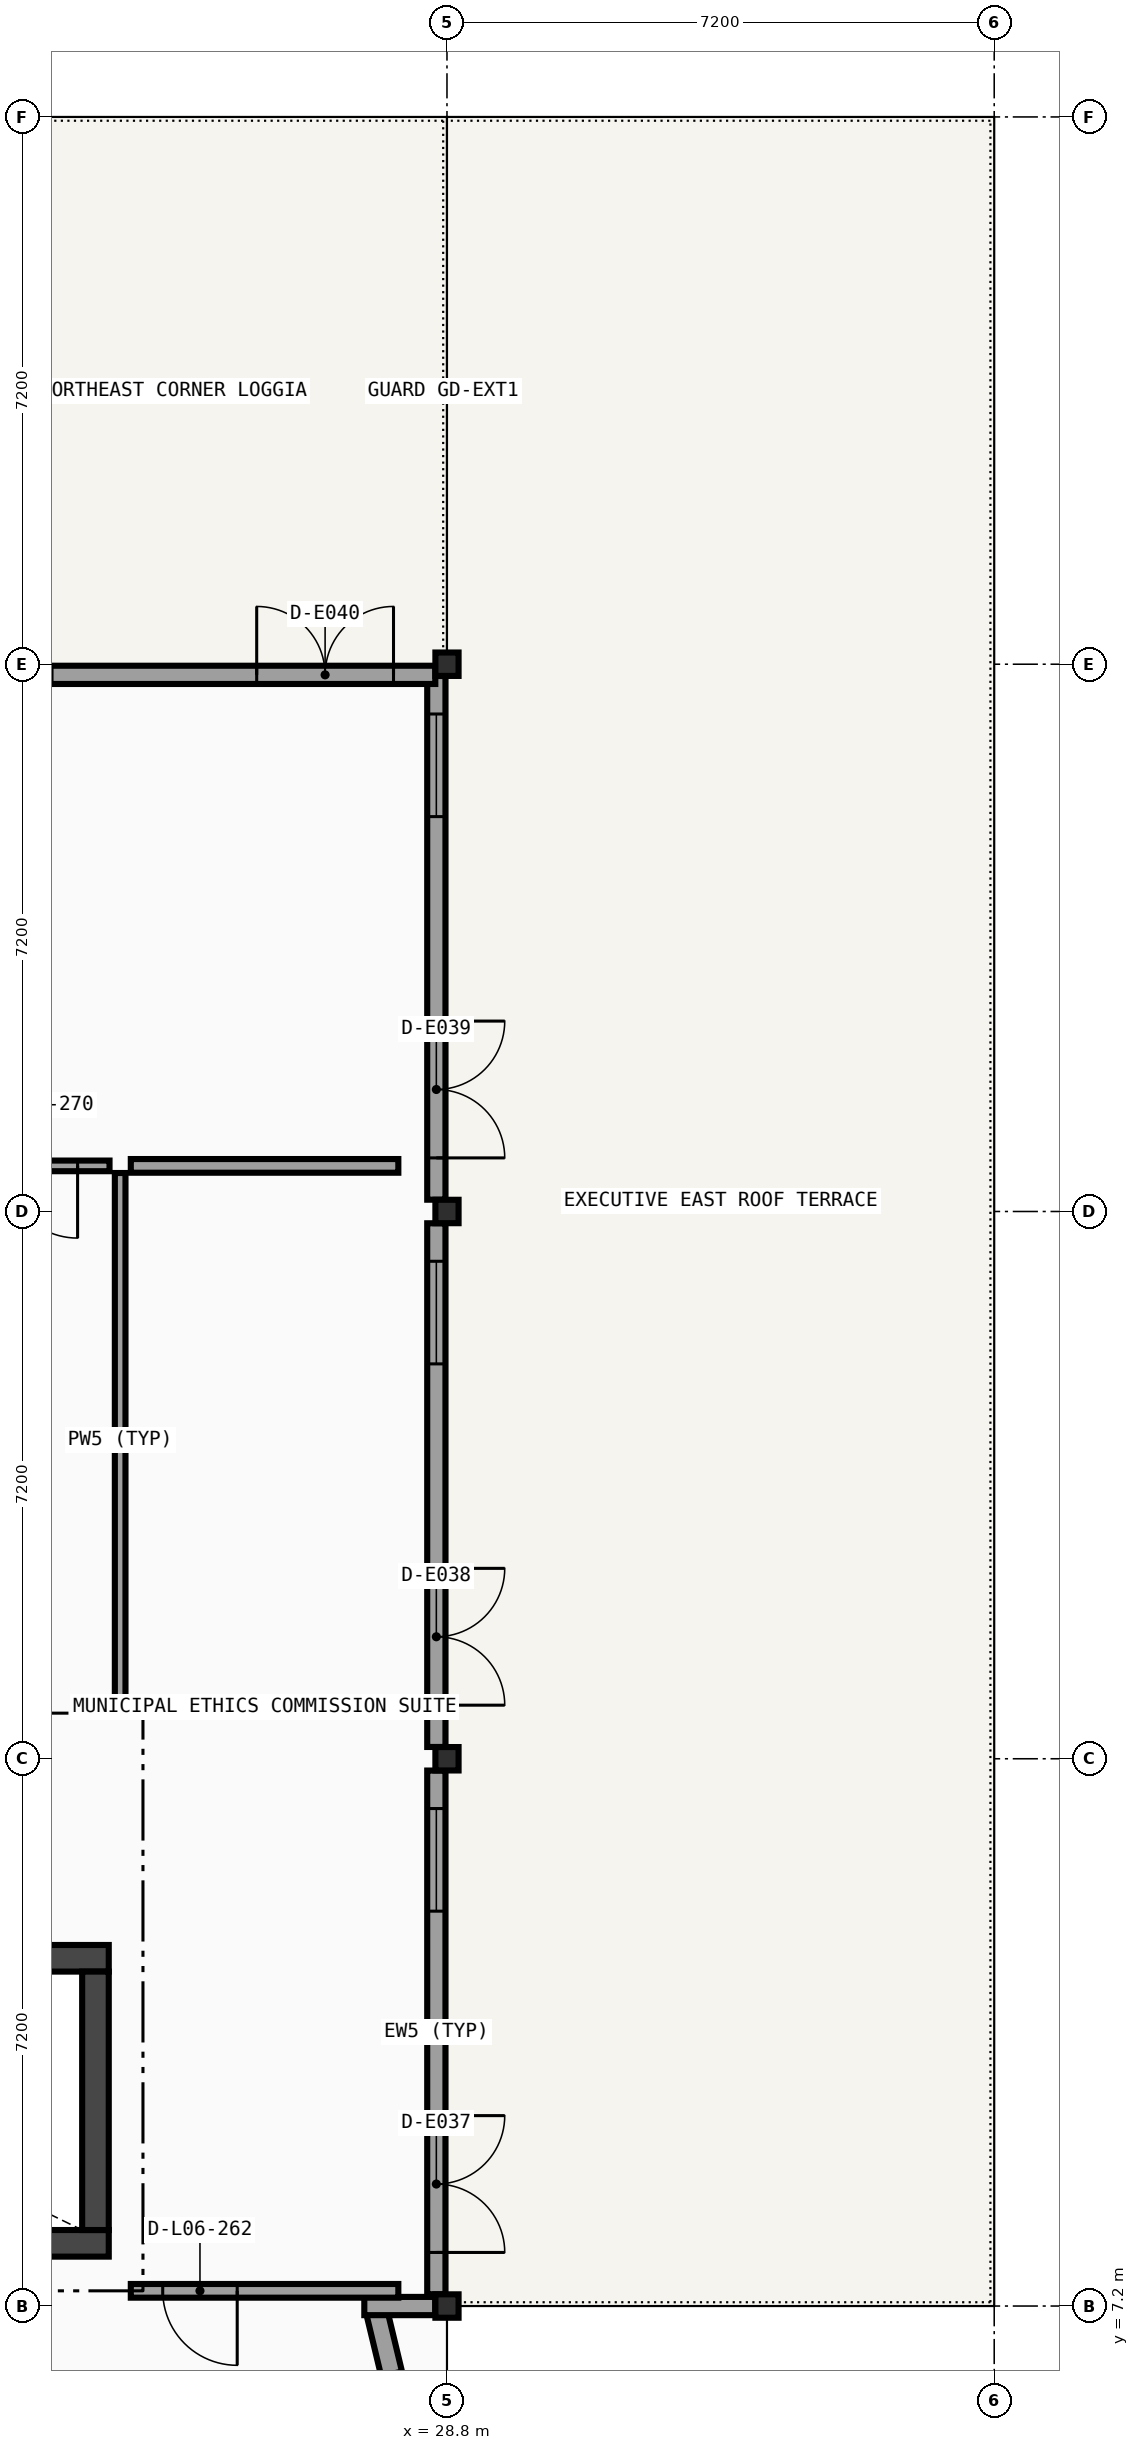
"""IFC4 building model, lengths in metres.
Left out: names, types, materials, properties, quantities, classifications, styles, units other than length and angle.
Written with IfcOpenShell. Run it as: python <this file> out.ifc"""

import sys

from ifc_helpers import new_model, si_unit, direction, frame, frame_2d, origin, origin_2d, place, context, subcontext, project, spatial, rectangle, i_section, extrude, element, fill, save


model = new_model("IFC4")
c1 = context("Model", 3, precision=1e-05, world=origin(), true_north=direction((0.0, 1.0)))
c2 = subcontext(c1, "Body", "Model", "MODEL_VIEW")
j1 = project(units=[si_unit("LENGTHUNIT", "METRE"), si_unit("PLANEANGLEUNIT", "RADIAN")], contexts=[c1])
p1 = place(None, origin())
s1 = spatial("IfcSite", under=j1, at=p1, CompositionType="ELEMENT")
p2 = place(p1, origin())
s2 = spatial("IfcBuilding", under=s1, at=p2, CompositionType="ELEMENT")
p3 = place(p2, frame((0.0, 0.0, 27.0)))
s3 = spatial("IfcBuildingStorey", under=s2, at=p3, CompositionType="ELEMENT", Elevation=27.0)
for number, where, z_axis, x_axis in (
    (1, (28.8, 7.2, 0.0), (0.0, 0.0, 1.0), (1.0, 0.0, 0.0)),
    (2, (28.8, 14.4, 0.0), (0.0, 0.0, 1.0), (1.0, 0.0, 0.0)),
    (3, (28.8, 21.6, 0.0), (0.0, 0.0, 1.0), (1.0, 0.0, 0.0)),
    (4, (28.8, 28.8, 0.0), (0.0, 0.0, 1.0), (1.0, 0.0, 0.0)),
):
    element("IfcColumn", number, at=place(p3, frame(where, z_axis=z_axis, x_axis=x_axis)), inside=s3, PredefinedType="COLUMN", context=c2, shape_type="SweptSolid", body=[
        extrude(i_section(OverallWidth=0.305, OverallDepth=0.308, WebThickness=0.01, FlangeThickness=0.015, FilletRadius=0.015, at=origin_2d()), origin(), (0.0, 0.0, 1.0), 4.05),
    ])
p4 = place(p3, frame((28.64, 3.94, 0.0), z_axis=(0.0, 0.0, 1.0), x_axis=(-0.233443812137, 0.972370292931, 0.0)))
e5 = element("IfcWall", 5, at=p4, inside=s3, PredefinedType="SOLIDWALL", context=c2, shape_type="SweptSolid", body=[
    extrude(rectangle(XDim=3.258, YDim=0.28, at=frame_2d((1.629, 0.0))), origin(), (0.0, 0.0, 1.0), 3.246),
])
p5 = place(p4, frame((0.804, 0.0, 0.8)))
e6 = element("IfcOpeningElement", 6, at=p5, cuts=e5, PredefinedType="OPENING", context=c2, shape_type="SweptSolid", body=[
    extrude(rectangle(XDim=1.65, YDim=1.9, at=frame_2d((0.825, 0.95))), frame((0.0, 0.15, 0.0), z_axis=(0.0, -1.0, 0.0), x_axis=(1.0, 0.0, 0.0)), (0.0, 0.0, 1.0), 0.3),
])
p6 = place(p3, frame((27.712, 7.2, 0.0), z_axis=(0.0, 0.0, 1.0), x_axis=(1.0, 0.0, 0.0)))
e7 = element("IfcWall", 7, at=p6, inside=s3, PredefinedType="SOLIDWALL", context=c2, shape_type="SweptSolid", body=[
    extrude(rectangle(XDim=0.933, YDim=0.24, at=frame_2d((0.467, 0.0))), origin(), (0.0, 0.0, 1.0), 3.246),
])
p7 = place(p3, frame((28.66, 7.355, 0.0), z_axis=(0.0, 0.0, 1.0), x_axis=(0.0, 1.0, 0.0)))
e8 = element("IfcWall", 8, at=p7, inside=s3, PredefinedType="SOLIDWALL", context=c2, shape_type="SweptSolid", body=[
    extrude(rectangle(XDim=6.89, YDim=0.24, at=frame_2d((3.445, 0.0))), origin(), (0.0, 0.0, 1.0), 3.256),
])
p8 = place(p7, frame((0.55, 0.0, 0.0)))
e9 = element("IfcOpeningElement", 9, at=p8, cuts=e8, PredefinedType="OPENING", context=c2, shape_type="SweptSolid", body=[
    extrude(rectangle(XDim=1.8, YDim=2.15, at=frame_2d((0.9, 1.075))), frame((0.0, 0.13, 0.0), z_axis=(0.0, -1.0, 0.0), x_axis=(1.0, 0.0, 0.0)), (0.0, 0.0, 1.0), 0.26),
])
p9 = place(p7, frame((5.04, 0.0, 0.85)))
e10 = element("IfcOpeningElement", 10, at=p9, cuts=e8, PredefinedType="OPENING", context=c2, shape_type="SweptSolid", body=[
    extrude(rectangle(XDim=1.35, YDim=1.85, at=frame_2d((0.675, 0.925))), frame((0.0, 0.13, 0.0), z_axis=(0.0, -1.0, 0.0), x_axis=(1.0, 0.0, 0.0)), (0.0, 0.0, 1.0), 0.26),
])
p10 = place(p3, frame((28.66, 14.555, 0.0), z_axis=(0.0, 0.0, 1.0), x_axis=(0.0, 1.0, 0.0)))
e11 = element("IfcWall", 11, at=p10, inside=s3, PredefinedType="SOLIDWALL", context=c2, shape_type="SweptSolid", body=[
    extrude(rectangle(XDim=6.89, YDim=0.24, at=frame_2d((3.445, 0.0))), origin(), (0.0, 0.0, 1.0), 3.256),
])
p11 = place(p10, frame((0.55, 0.0, 0.0)))
e12 = element("IfcOpeningElement", 12, at=p11, cuts=e11, PredefinedType="OPENING", context=c2, shape_type="SweptSolid", body=[
    extrude(rectangle(XDim=1.8, YDim=2.15, at=frame_2d((0.9, 1.075))), frame((0.0, 0.13, 0.0), z_axis=(0.0, -1.0, 0.0), x_axis=(1.0, 0.0, 0.0)), (0.0, 0.0, 1.0), 0.26),
])
p12 = place(p10, frame((5.04, 0.0, 0.85)))
e13 = element("IfcOpeningElement", 13, at=p12, cuts=e11, PredefinedType="OPENING", context=c2, shape_type="SweptSolid", body=[
    extrude(rectangle(XDim=1.35, YDim=1.85, at=frame_2d((0.675, 0.925))), frame((0.0, 0.13, 0.0), z_axis=(0.0, -1.0, 0.0), x_axis=(1.0, 0.0, 0.0)), (0.0, 0.0, 1.0), 0.26),
])
p13 = place(p3, frame((28.66, 21.755, 0.0), z_axis=(0.0, 0.0, 1.0), x_axis=(0.0, 1.0, 0.0)))
e14 = element("IfcWall", 14, at=p13, inside=s3, PredefinedType="SOLIDWALL", context=c2, shape_type="SweptSolid", body=[
    extrude(rectangle(XDim=6.89, YDim=0.24, at=frame_2d((3.445, 0.0))), origin(), (0.0, 0.0, 1.0), 3.256),
])
p14 = place(p13, frame((0.55, 0.0, 0.0)))
e15 = element("IfcOpeningElement", 15, at=p14, cuts=e14, PredefinedType="OPENING", context=c2, shape_type="SweptSolid", body=[
    extrude(rectangle(XDim=1.8, YDim=2.15, at=frame_2d((0.9, 1.075))), frame((0.0, 0.13, 0.0), z_axis=(0.0, -1.0, 0.0), x_axis=(1.0, 0.0, 0.0)), (0.0, 0.0, 1.0), 0.26),
])
p15 = place(p13, frame((5.04, 0.0, 0.85)))
e16 = element("IfcOpeningElement", 16, at=p15, cuts=e14, PredefinedType="OPENING", context=c2, shape_type="SweptSolid", body=[
    extrude(rectangle(XDim=1.35, YDim=1.85, at=frame_2d((0.675, 0.925))), frame((0.0, 0.13, 0.0), z_axis=(0.0, -1.0, 0.0), x_axis=(1.0, 0.0, 0.0)), (0.0, 0.0, 1.0), 0.26),
])
p16 = place(p3, frame((28.646, 28.66, 0.0), z_axis=(0.0, 0.0, 1.0), x_axis=(-1.0, 0.0, 0.0)))
e17 = element("IfcWall", 17, at=p16, inside=s3, PredefinedType="SOLIDWALL", context=c2, shape_type="SweptSolid", body=[
    extrude(rectangle(XDim=6.893, YDim=0.24, at=frame_2d((3.447, 0.0))), origin(), (0.0, 0.0, 1.0), 3.246),
])
p17 = place(p16, frame((0.55, 0.0, 0.0)))
e18 = element("IfcOpeningElement", 18, at=p17, cuts=e17, PredefinedType="OPENING", context=c2, shape_type="SweptSolid", body=[
    extrude(rectangle(XDim=1.8, YDim=2.15, at=frame_2d((0.9, 1.075))), frame((0.0, 0.13, 0.0), z_axis=(0.0, -1.0, 0.0), x_axis=(1.0, 0.0, 0.0)), (0.0, 0.0, 1.0), 0.26),
])
p18 = place(p16, frame((5.043, 0.0, 0.85)))
e19 = element("IfcOpeningElement", 19, at=p18, cuts=e17, PredefinedType="OPENING", context=c2, shape_type="SweptSolid", body=[
    extrude(rectangle(XDim=1.35, YDim=1.85, at=frame_2d((0.675, 0.925))), frame((0.0, 0.13, 0.0), z_axis=(0.0, -1.0, 0.0), x_axis=(1.0, 0.0, 0.0)), (0.0, 0.0, 1.0), 0.26),
])
for number, where, z_axis, x_axis in (
    (20, (15.05, 8.025, 0.0), (0.0, 0.0, 1.0), (1.0, 0.0, 0.0)),
    (21, (24.35, 11.775, 0.0), (0.0, 0.0, 1.0), (-1.0, 0.0, 0.0)),
):
    element("IfcWall", number, at=place(p3, frame(where, z_axis=z_axis, x_axis=x_axis)), inside=s3, PredefinedType="SHEAR", context=c2, shape_type="SweptSolid", body=[
        extrude(rectangle(XDim=9.3, YDim=0.35, at=frame_2d((4.65, 0.0))), origin(), (0.0, 0.0, 1.0), 3.8),
    ])
p19 = place(p3, frame((24.175, 8.2, 0.0), z_axis=(0.0, 0.0, 1.0), x_axis=(0.0, 1.0, 0.0)))
e22 = element("IfcWall", 22, at=p19, inside=s3, PredefinedType="SHEAR", context=c2, shape_type="SweptSolid", body=[
    extrude(rectangle(XDim=3.4, YDim=0.35, at=frame_2d((1.7, 0.0))), origin(), (0.0, 0.0, 1.0), 3.8),
])
p20 = place(p3, frame((24.64, 22.2, 0.0), z_axis=(0.0, 0.0, 1.0), x_axis=(1.0, 0.0, 0.0)))
e23 = element("IfcWall", 23, at=p20, inside=s3, PredefinedType="PARTITIONING", context=c2, shape_type="SweptSolid", body=[
    extrude(rectangle(XDim=3.52, YDim=0.18, at=frame_2d((1.76, 0.0))), origin(), (0.0, 0.0, 1.0), 3.8),
])
p21 = place(p3, frame((21.24, 22.2, 0.0), z_axis=(0.0, 0.0, 1.0), x_axis=(1.0, 0.0, 0.0)))
e24 = element("IfcWall", 24, at=p21, inside=s3, PredefinedType="PARTITIONING", context=c2, shape_type="SweptSolid", body=[
    extrude(rectangle(XDim=3.12, YDim=0.14, at=frame_2d((1.56, 0.0))), origin(), (0.0, 0.0, 1.0), 3.246),
])
p22 = place(p21, frame((1.75, 0.0, 0.0)))
e25 = element("IfcOpeningElement", 25, at=p22, cuts=e24, PredefinedType="OPENING", context=c2, shape_type="SweptSolid", body=[
    extrude(rectangle(XDim=0.95, YDim=2.08, at=frame_2d((0.475, 1.04))), frame((0.0, 0.08, 0.0), z_axis=(0.0, -1.0, 0.0), x_axis=(1.0, 0.0, 0.0)), (0.0, 0.0, 1.0), 0.16),
])
p23 = place(p3, frame((24.64, 7.4, 0.0), z_axis=(0.0, 0.0, 1.0), x_axis=(1.0, 0.0, 0.0)))
e26 = element("IfcWall", 26, at=p23, inside=s3, PredefinedType="PARTITIONING", context=c2, shape_type="SweptSolid", body=[
    extrude(rectangle(XDim=3.52, YDim=0.18, at=frame_2d((1.76, 0.0))), origin(), (0.0, 0.0, 1.0), 3.246),
])
p24 = place(p23, frame((0.42, 0.0, 0.0)))
e27 = element("IfcOpeningElement", 27, at=p24, cuts=e26, PredefinedType="OPENING", context=c2, shape_type="SweptSolid", body=[
    extrude(rectangle(XDim=0.98, YDim=2.1, at=frame_2d((0.49, 1.05))), frame((0.0, 0.1, 0.0), z_axis=(0.0, -1.0, 0.0), x_axis=(1.0, 0.0, 0.0)), (0.0, 0.0, 1.0), 0.2),
])
p25 = place(p3, frame((24.5, 15.071, 0.0), z_axis=(0.0, 0.0, 1.0), x_axis=(0.0, 1.0, 0.0)))
e28 = element("IfcWall", 28, at=p25, inside=s3, PredefinedType="PARTITIONING", context=c2, shape_type="SweptSolid", body=[
    extrude(rectangle(XDim=7.035, YDim=0.14, at=frame_2d((3.518, 0.0))), origin(), (0.0, 0.0, 1.0), 3.246),
])
p26 = place(p8, frame((1.8, 0.0, 0.0), z_axis=(0.0, 0.0, 1.0), x_axis=(-1.0, 0.0, 0.0)))
e29 = element("IfcDoor", 29, at=p26, inside=s3, OperationType="DOUBLE_DOOR_SINGLE_SWING", PredefinedType="DOOR", context=c2, shape_type="SweptSolid", body=[
    extrude(rectangle(XDim=1.8, YDim=2.15, at=frame_2d((0.9, 1.075))), frame((0.0, 0.025, 0.0), z_axis=(0.0, -1.0, 0.0), x_axis=(1.0, 0.0, 0.0)), (0.0, 0.0, 1.0), 0.05),
])
fill(e9, e29)
p27 = place(p9, origin())
e30 = element("IfcWindow", 30, at=p27, inside=s3, PartitioningType="SINGLE_PANEL", PredefinedType="WINDOW", context=c2, shape_type="SweptSolid", body=[
    extrude(rectangle(XDim=1.35, YDim=1.85, at=frame_2d((0.675, 0.925))), frame((0.0, 0.03, 0.0), z_axis=(0.0, -1.0, 0.0), x_axis=(1.0, 0.0, 0.0)), (0.0, 0.0, 1.0), 0.06),
])
fill(e10, e30)
p28 = place(p11, frame((1.8, 0.0, 0.0), z_axis=(0.0, 0.0, 1.0), x_axis=(-1.0, 0.0, 0.0)))
e31 = element("IfcDoor", 31, at=p28, inside=s3, OperationType="DOUBLE_DOOR_SINGLE_SWING", PredefinedType="DOOR", context=c2, shape_type="SweptSolid", body=[
    extrude(rectangle(XDim=1.8, YDim=2.15, at=frame_2d((0.9, 1.075))), frame((0.0, 0.025, 0.0), z_axis=(0.0, -1.0, 0.0), x_axis=(1.0, 0.0, 0.0)), (0.0, 0.0, 1.0), 0.05),
])
fill(e12, e31)
p29 = place(p12, origin())
e32 = element("IfcWindow", 32, at=p29, inside=s3, PartitioningType="SINGLE_PANEL", PredefinedType="WINDOW", context=c2, shape_type="SweptSolid", body=[
    extrude(rectangle(XDim=1.35, YDim=1.85, at=frame_2d((0.675, 0.925))), frame((0.0, 0.03, 0.0), z_axis=(0.0, -1.0, 0.0), x_axis=(1.0, 0.0, 0.0)), (0.0, 0.0, 1.0), 0.06),
])
fill(e13, e32)
p30 = place(p14, frame((1.8, 0.0, 0.0), z_axis=(0.0, 0.0, 1.0), x_axis=(-1.0, 0.0, 0.0)))
e33 = element("IfcDoor", 33, at=p30, inside=s3, OperationType="DOUBLE_DOOR_SINGLE_SWING", PredefinedType="DOOR", context=c2, shape_type="SweptSolid", body=[
    extrude(rectangle(XDim=1.8, YDim=2.15, at=frame_2d((0.9, 1.075))), frame((0.0, 0.025, 0.0), z_axis=(0.0, -1.0, 0.0), x_axis=(1.0, 0.0, 0.0)), (0.0, 0.0, 1.0), 0.05),
])
fill(e15, e33)
p31 = place(p15, origin())
e34 = element("IfcWindow", 34, at=p31, inside=s3, PartitioningType="SINGLE_PANEL", PredefinedType="WINDOW", context=c2, shape_type="SweptSolid", body=[
    extrude(rectangle(XDim=1.35, YDim=1.85, at=frame_2d((0.675, 0.925))), frame((0.0, 0.03, 0.0), z_axis=(0.0, -1.0, 0.0), x_axis=(1.0, 0.0, 0.0)), (0.0, 0.0, 1.0), 0.06),
])
fill(e16, e34)
p32 = place(p17, frame((1.8, 0.0, 0.0), z_axis=(0.0, 0.0, 1.0), x_axis=(-1.0, 0.0, 0.0)))
e35 = element("IfcDoor", 35, at=p32, inside=s3, OperationType="DOUBLE_DOOR_SINGLE_SWING", PredefinedType="DOOR", context=c2, shape_type="SweptSolid", body=[
    extrude(rectangle(XDim=1.8, YDim=2.15, at=frame_2d((0.9, 1.075))), frame((0.0, 0.025, 0.0), z_axis=(0.0, -1.0, 0.0), x_axis=(1.0, 0.0, 0.0)), (0.0, 0.0, 1.0), 0.05),
])
fill(e18, e35)
p33 = place(p18, origin())
e36 = element("IfcWindow", 36, at=p33, inside=s3, PartitioningType="SINGLE_PANEL", PredefinedType="WINDOW", context=c2, shape_type="SweptSolid", body=[
    extrude(rectangle(XDim=1.35, YDim=1.85, at=frame_2d((0.675, 0.925))), frame((0.0, 0.03, 0.0), z_axis=(0.0, -1.0, 0.0), x_axis=(1.0, 0.0, 0.0)), (0.0, 0.0, 1.0), 0.06),
])
fill(e19, e36)
p34 = place(p24, origin())
e37 = element("IfcDoor", 37, at=p34, inside=s3, OperationType="SINGLE_SWING_RIGHT", PredefinedType="DOOR", context=c2, shape_type="SweptSolid", body=[
    extrude(rectangle(XDim=0.98, YDim=2.1, at=frame_2d((0.49, 1.05))), frame((0.0, 0.025, 0.0), z_axis=(0.0, -1.0, 0.0), x_axis=(1.0, 0.0, 0.0)), (0.0, 0.0, 1.0), 0.05),
])
fill(e27, e37)
p35 = place(p22, origin())
e38 = element("IfcDoor", 38, at=p35, inside=s3, OperationType="SINGLE_SWING_RIGHT", PredefinedType="DOOR", context=c2, shape_type="SweptSolid", body=[
    extrude(rectangle(XDim=0.95, YDim=2.08, at=frame_2d((0.475, 1.04))), frame((0.0, 0.025, 0.0), z_axis=(0.0, -1.0, 0.0), x_axis=(1.0, 0.0, 0.0)), (0.0, 0.0, 1.0), 0.05),
])
fill(e25, e38)
save(model, sys.argv[1])
